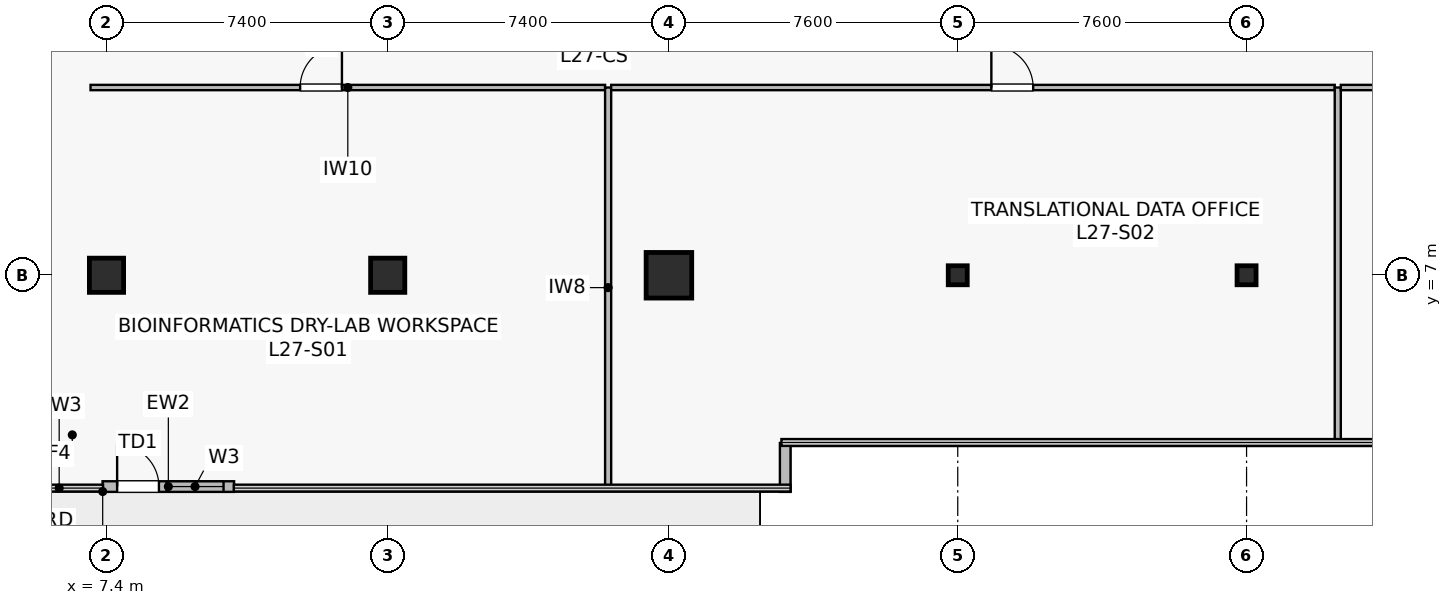
"""IFC4 building model, lengths in metres.
Left out: names, types, materials, properties, quantities, classifications, styles, units other than length and angle.
Written with IfcOpenShell. Run it as: python <this file> out.ifc"""

import sys

from ifc_helpers import new_model, si_unit, direction, frame, frame_2d, origin, origin_2d, place, context, subcontext, project, spatial, rectangle, hollow_rectangle, extrude, source, transform, mapped, element, fill, save


model = new_model("IFC4")
c1 = context("Model", 3, precision=1e-05, world=origin(), true_north=direction((0.0, 1.0)))
c2 = subcontext(c1, "Body", "Model", "MODEL_VIEW")
j1 = project(units=[si_unit("LENGTHUNIT", "METRE"), si_unit("PLANEANGLEUNIT", "RADIAN")], contexts=[c1])
p1 = place(None, origin())
s1 = spatial("IfcSite", under=j1, at=p1, CompositionType="ELEMENT")
p2 = place(p1, origin())
s2 = spatial("IfcBuilding", under=s1, at=p2, CompositionType="ELEMENT")
p3 = place(p2, frame((0.0, 0.0, 113.3)))
s3 = spatial("IfcBuildingStorey", under=s2, at=p3, CompositionType="ELEMENT", Elevation=113.3)
m1 = source(origin(), c2, "Body", "SweptSolid", [
    extrude(rectangle(XDim=0.9, YDim=0.9, at=origin_2d()), origin(), (0.0, 0.0, 1.0), 4.1),
])
p4 = place(p3, frame((14.8, 7.0, 0.0), z_axis=(0.0, 0.0, 1.0), x_axis=(1.0, 0.0, 0.0)))
e1 = element("IfcColumn", 1, at=p4, inside=s3, PredefinedType="COLUMN", context=c2, shape_type="MappedRepresentation", body=[
    mapped(m1, transform((0.0, 0.0, 0.0), scale=1.0)),
])
m2 = source(origin(), c2, "Body", "SweptSolid", [
    extrude(rectangle(XDim=1.2, YDim=1.2, at=origin_2d()), origin(), (0.0, 0.0, 1.0), 4.1),
])
p5 = place(p3, frame((22.2, 7.0, 0.0), z_axis=(0.0, 0.0, 1.0), x_axis=(1.0, 0.0, 0.0)))
e2 = element("IfcColumn", 2, at=p5, inside=s3, PredefinedType="COLUMN", context=c2, shape_type="MappedRepresentation", body=[
    mapped(m2, transform((0.0, 0.0, 0.0), scale=1.0)),
])
p6 = place(p3, frame((7.4, 7.0, 0.0), z_axis=(0.0, 0.0, 1.0), x_axis=(1.0, 0.0, 0.0)))
e3 = element("IfcColumn", 3, at=p6, inside=s3, PredefinedType="COLUMN", context=c2, shape_type="MappedRepresentation", body=[
    mapped(m1, transform((0.0, 0.0, 0.0), scale=1.0)),
])
m3 = source(origin(), c2, "Body", "SweptSolid", [
    extrude(hollow_rectangle(XDim=0.5, YDim=0.5, WallThickness=0.022, at=origin_2d()), origin(), (0.0, 0.0, 1.0), 4.1),
])
for number, where, z_axis, x_axis in (
    (4, (29.8, 7.0, 0.0), (0.0, 0.0, 1.0), (1.0, 0.0, 0.0)),
    (5, (37.4, 7.0, 0.0), (0.0, 0.0, 1.0), (1.0, 0.0, 0.0)),
):
    element("IfcColumn", number, at=place(p3, frame(where, z_axis=z_axis, x_axis=x_axis)), inside=s3, PredefinedType="COLUMN", context=c2, shape_type="MappedRepresentation", body=[
        mapped(m3, transform((0.0, 0.0, 0.0), scale=1.0)),
    ])
p7 = place(p3, frame((7.297, 1.44, 0.0), z_axis=(0.0, 0.0, 1.0), x_axis=(1.0, 0.0, 0.0)))
e6 = element("IfcWall", 6, at=p7, inside=s3, PredefinedType="STANDARD", context=c2, shape_type="SweptSolid", body=[
    extrude(rectangle(XDim=3.461, YDim=0.28, at=frame_2d((1.73, 0.0))), origin(), (0.0, 0.0, 1.0), 3.79),
])
p8 = place(p7, frame((0.383, 0.0, 0.0)))
e7 = element("IfcOpeningElement", 7, at=p8, cuts=e6, PredefinedType="OPENING", context=c2, shape_type="SweptSolid", body=[
    extrude(rectangle(XDim=1.1, YDim=2.2, at=frame_2d((0.55, 1.1))), frame((0.0, 0.15, 0.0), z_axis=(0.0, -1.0, 0.0), x_axis=(1.0, 0.0, 0.0)), (0.0, 0.0, 1.0), 0.3),
])
p9 = place(p7, frame((1.683, 0.0, 0.9)))
e8 = element("IfcOpeningElement", 8, at=p9, cuts=e6, PredefinedType="OPENING", context=c2, shape_type="SweptSolid", body=[
    extrude(rectangle(XDim=1.5, YDim=2.2, at=frame_2d((0.75, 1.1))), frame((0.0, 0.15, 0.0), z_axis=(0.0, -1.0, 0.0), x_axis=(1.0, 0.0, 0.0)), (0.0, 0.0, 1.0), 0.3),
])
p10 = place(p3, frame((25.26, 1.3, 0.0), z_axis=(0.0, 0.0, 1.0), x_axis=(0.0, 1.0, 0.0)))
e9 = element("IfcWall", 9, at=p10, inside=s3, PredefinedType="STANDARD", context=c2, shape_type="SweptSolid", body=[
    extrude(rectangle(XDim=1.288, YDim=0.28, at=frame_2d((0.644, 0.0))), origin(), (0.0, 0.0, 1.0), 3.79),
])
p11 = place(p3, frame((6.98, 11.94, 0.0), z_axis=(0.0, 0.0, 1.0), x_axis=(1.0, 0.0, 0.0)))
e10 = element("IfcWall", 10, at=p11, inside=s3, PredefinedType="PARTITIONING", context=c2, shape_type="SweptSolid", body=[
    extrude(rectangle(XDim=13.54, YDim=0.14, at=frame_2d((6.77, 0.0))), origin(), (0.0, 0.0, 1.0), 3.125),
])
p12 = place(p11, frame((5.516, 0.0, 0.0)))
e11 = element("IfcOpeningElement", 11, at=p12, cuts=e10, PredefinedType="OPENING", context=c2, shape_type="SweptSolid", body=[
    extrude(rectangle(XDim=1.1, YDim=2.18, at=frame_2d((0.55, 1.09))), frame((0.0, 0.08, 0.0), z_axis=(0.0, -1.0, 0.0), x_axis=(1.0, 0.0, 0.0)), (0.0, 0.0, 1.0), 0.16),
])
p13 = place(p3, frame((20.6, 1.41, 0.0), z_axis=(0.0, 0.0, 1.0), x_axis=(0.0, 1.0, 0.0)))
e12 = element("IfcWall", 12, at=p13, inside=s3, PredefinedType="PARTITIONING", context=c2, shape_type="SweptSolid", body=[
    extrude(rectangle(XDim=10.53, YDim=0.16, at=frame_2d((5.265, 0.0))), origin(), (0.0, 0.0, 1.0), 3.075),
])
p14 = place(p3, frame((20.68, 11.94, 0.0), z_axis=(0.0, 0.0, 1.0), x_axis=(1.0, 0.0, 0.0)))
e13 = element("IfcWall", 13, at=p14, inside=s3, PredefinedType="PARTITIONING", context=c2, shape_type="SweptSolid", body=[
    extrude(rectangle(XDim=19.04, YDim=0.14, at=frame_2d((9.52, 0.0))), origin(), (0.0, 0.0, 1.0), 3.125),
])
p15 = place(p14, frame((10.004, 0.0, 0.0)))
e14 = element("IfcOpeningElement", 14, at=p15, cuts=e13, PredefinedType="OPENING", context=c2, shape_type="SweptSolid", body=[
    extrude(rectangle(XDim=1.1, YDim=2.18, at=frame_2d((0.55, 1.09))), frame((0.0, 0.08, 0.0), z_axis=(0.0, -1.0, 0.0), x_axis=(1.0, 0.0, 0.0)), (0.0, 0.0, 1.0), 0.16),
])
p16 = place(p3, frame((39.8, 2.61, 0.0), z_axis=(0.0, 0.0, 1.0), x_axis=(0.0, 1.0, 0.0)))
e15 = element("IfcWall", 15, at=p16, inside=s3, PredefinedType="PARTITIONING", context=c2, shape_type="SweptSolid", body=[
    extrude(rectangle(XDim=9.33, YDim=0.16, at=frame_2d((4.665, 0.0))), origin(), (0.0, 0.0, 1.0), 3.075),
])
p17 = place(p3, frame((39.88, 11.94, 0.0), z_axis=(0.0, 0.0, 1.0), x_axis=(1.0, 0.0, 0.0)))
e16 = element("IfcWall", 16, at=p17, inside=s3, PredefinedType="PARTITIONING", context=c2, shape_type="SweptSolid", body=[
    extrude(rectangle(XDim=16.44, YDim=0.14, at=frame_2d((8.22, 0.0))), origin(), (0.0, 0.0, 1.0), 3.125),
])
p18 = place(p17, frame((6.792, 0.0, 0.0)))
e17 = element("IfcOpeningElement", 17, at=p18, cuts=e16, PredefinedType="OPENING", context=c2, shape_type="SweptSolid", body=[
    extrude(rectangle(XDim=1.1, YDim=2.18, at=frame_2d((0.55, 1.09))), frame((0.0, 0.08, 0.0), z_axis=(0.0, -1.0, 0.0), x_axis=(1.0, 0.0, 0.0)), (0.0, 0.0, 1.0), 0.16),
])
m4 = source(origin(), c2, "Body", "SweptSolid", [
    extrude(rectangle(XDim=1.1, YDim=2.2, at=frame_2d((0.55, 1.1))), frame((0.0, 0.025, 0.0), z_axis=(0.0, -1.0, 0.0), x_axis=(1.0, 0.0, 0.0)), (0.0, 0.0, 1.0), 0.05),
])
p19 = place(p8, origin())
e18 = element("IfcDoor", 18, at=p19, inside=s3, OperationType="SINGLE_SWING_LEFT", PredefinedType="DOOR", context=c2, shape_type="MappedRepresentation", body=[
    mapped(m4, transform((0.0, 0.0, 0.0), scale=1.0)),
])
fill(e7, e18)
m5 = source(origin(), c2, "Body", "SweptSolid", [
    extrude(rectangle(XDim=1.5, YDim=2.2, at=frame_2d((0.75, 1.1))), frame((0.0, 0.03, 0.0), z_axis=(0.0, -1.0, 0.0), x_axis=(1.0, 0.0, 0.0)), (0.0, 0.0, 1.0), 0.06),
])
p20 = place(p9, origin())
e19 = element("IfcWindow", 19, at=p20, inside=s3, PartitioningType="SINGLE_PANEL", PredefinedType="WINDOW", context=c2, shape_type="MappedRepresentation", body=[
    mapped(m5, transform((0.0, 0.0, 0.0), scale=1.0)),
])
fill(e8, e19)
m6 = source(origin(), c2, "Body", "SweptSolid", [
    extrude(rectangle(XDim=1.1, YDim=2.18, at=frame_2d((0.55, 1.09))), frame((0.0, 0.025, 0.0), z_axis=(0.0, -1.0, 0.0), x_axis=(1.0, 0.0, 0.0)), (0.0, 0.0, 1.0), 0.05),
])
p21 = place(p12, origin())
e20 = element("IfcDoor", 20, at=p21, inside=s3, OperationType="SINGLE_SWING_RIGHT", PredefinedType="DOOR", context=c2, shape_type="MappedRepresentation", body=[
    mapped(m6, transform((0.0, 0.0, 0.0), scale=1.0)),
])
fill(e11, e20)
p22 = place(p15, origin())
e21 = element("IfcDoor", 21, at=p22, inside=s3, OperationType="SINGLE_SWING_LEFT", PredefinedType="DOOR", context=c2, shape_type="MappedRepresentation", body=[
    mapped(m6, transform((0.0, 0.0, 0.0), scale=1.0)),
])
fill(e14, e21)
save(model, sys.argv[1])
